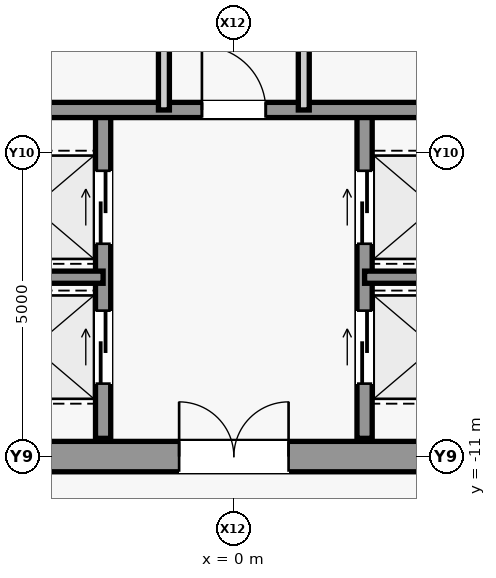
"""IFC4 building model, lengths in metres.
Left out: names, types, materials, properties, quantities, classifications, styles, units other than length and angle.
Written with IfcOpenShell. Run it as: python <this file> out.ifc"""

import sys

from ifc_helpers import new_model, si_unit, direction, frame, frame_2d, origin, place, context, subcontext, project, spatial, rectangle, extrude, source, transform, mapped, element, fill, save


model = new_model("IFC4")
c1 = context("Model", 3, precision=1e-05, world=origin(), true_north=direction((0.0, 1.0)))
c2 = subcontext(c1, "Body", "Model", "MODEL_VIEW")
j1 = project(units=[si_unit("LENGTHUNIT", "METRE"), si_unit("PLANEANGLEUNIT", "RADIAN")], contexts=[c1])
p1 = place(None, origin())
s1 = spatial("IfcSite", under=j1, at=p1, CompositionType="ELEMENT")
p2 = place(p1, origin())
s2 = spatial("IfcBuilding", under=s1, at=p2, CompositionType="ELEMENT")
p3 = place(p2, frame((0.0, 0.0, 32.6)))
s3 = spatial("IfcBuildingStorey", under=s2, at=p3, CompositionType="ELEMENT", Elevation=32.6)
m1 = source(origin(), c2, "Body", "SweptSolid", [
    extrude(rectangle(XDim=9.2, YDim=0.5, at=frame_2d((4.6, 0.0))), origin(), (0.0, 0.0, 1.0), 3.94),
])
p4 = place(p3, frame((-4.6, -11.0, 0.0), z_axis=(0.0, 0.0, 1.0), x_axis=(1.0, 0.0, 0.0)))
e1 = element("IfcWall", 1, at=p4, inside=s3, PredefinedType="SHEAR", context=c2, shape_type="MappedRepresentation", body=[
    mapped(m1, transform((0.0, 0.0, 0.0), scale=1.0)),
])
m2 = source(origin(), c2, "Body", "SweptSolid", [
    extrude(rectangle(XDim=1.8, YDim=2.25, at=frame_2d((0.9, 1.125))), frame((0.0, 0.26, 0.0), z_axis=(0.0, -1.0, 0.0), x_axis=(1.0, 0.0, 0.0)), (0.0, 0.0, 1.0), 0.52),
])
p5 = place(p4, frame((3.7, 0.0, 0.0)))
e2 = element("IfcOpeningElement", 2, at=p5, cuts=e1, PredefinedType="OPENING", context=c2, shape_type="MappedRepresentation", body=[
    mapped(m2, transform((0.0, 0.0, 0.0), scale=1.0)),
])
m3 = source(origin(), c2, "Body", "SweptSolid", [
    extrude(rectangle(XDim=5.4, YDim=0.25, at=frame_2d((2.7, 0.0))), origin(), (0.0, 0.0, 1.0), 3.94),
])
p6 = place(p3, frame((-2.15, -10.7, 0.0), z_axis=(0.0, 0.0, 1.0), x_axis=(0.0, 1.0, 0.0)))
e3 = element("IfcWall", 3, at=p6, inside=s3, PredefinedType="SHEAR", context=c2, shape_type="MappedRepresentation", body=[
    mapped(m3, transform((0.0, 0.0, 0.0), scale=1.0)),
])
m4 = source(origin(), c2, "Body", "SweptSolid", [
    extrude(rectangle(XDim=1.2, YDim=2.3, at=frame_2d((0.6, 1.15))), frame((0.0, 0.135, 0.0), z_axis=(0.0, -1.0, 0.0), x_axis=(1.0, 0.0, 0.0)), (0.0, 0.0, 1.0), 0.27),
])
p7 = place(p6, frame((0.9, 0.0, 0.0)))
e4 = element("IfcOpeningElement", 4, at=p7, cuts=e3, PredefinedType="OPENING", context=c2, shape_type="MappedRepresentation", body=[
    mapped(m4, transform((0.0, 0.0, 0.0), scale=1.0)),
])
p8 = place(p6, frame((3.2, 0.0, 0.0)))
e5 = element("IfcOpeningElement", 5, at=p8, cuts=e3, PredefinedType="OPENING", context=c2, shape_type="MappedRepresentation", body=[
    mapped(m4, transform((0.0, 0.0, 0.0), scale=1.0)),
])
p9 = place(p3, frame((2.15, -10.7, 0.0), z_axis=(0.0, 0.0, 1.0), x_axis=(0.0, 1.0, 0.0)))
e6 = element("IfcWall", 6, at=p9, inside=s3, PredefinedType="SHEAR", context=c2, shape_type="MappedRepresentation", body=[
    mapped(m3, transform((0.0, 0.0, 0.0), scale=1.0)),
])
p10 = place(p9, frame((0.9, 0.0, 0.0)))
e7 = element("IfcOpeningElement", 7, at=p10, cuts=e6, PredefinedType="OPENING", context=c2, shape_type="MappedRepresentation", body=[
    mapped(m4, transform((0.0, 0.0, 0.0), scale=1.0)),
])
p11 = place(p9, frame((3.2, 0.0, 0.0)))
e8 = element("IfcOpeningElement", 8, at=p11, cuts=e6, PredefinedType="OPENING", context=c2, shape_type="MappedRepresentation", body=[
    mapped(m4, transform((0.0, 0.0, 0.0), scale=1.0)),
])
m5 = source(origin(), c2, "Body", "SweptSolid", [
    extrude(rectangle(XDim=2.45, YDim=0.2, at=frame_2d((1.225, 0.0))), origin(), (0.0, 0.0, 1.0), 3.94),
])
for number, where, z_axis, x_axis in (
    (9, (-4.6, -8.05, 0.0), (0.0, 0.0, 1.0), (1.0, 0.0, 0.0)),
    (10, (2.15, -8.05, 0.0), (0.0, 0.0, 1.0), (1.0, 0.0, 0.0)),
):
    element("IfcWall", number, at=place(p3, frame(where, z_axis=z_axis, x_axis=x_axis)), inside=s3, PredefinedType="SHEAR", context=c2, shape_type="MappedRepresentation", body=[
        mapped(m5, transform((0.0, 0.0, 0.0), scale=1.0)),
    ])
m6 = source(origin(), c2, "Body", "SweptSolid", [
    extrude(rectangle(XDim=9.2, YDim=0.25, at=frame_2d((4.6, 0.0))), origin(), (0.0, 0.0, 1.0), 3.94),
])
p12 = place(p3, frame((-4.6, -5.3, 0.0), z_axis=(0.0, 0.0, 1.0), x_axis=(1.0, 0.0, 0.0)))
e11 = element("IfcWall", 11, at=p12, inside=s3, PredefinedType="SHEAR", context=c2, shape_type="MappedRepresentation", body=[
    mapped(m6, transform((0.0, 0.0, 0.0), scale=1.0)),
])
m7 = source(origin(), c2, "Body", "SweptSolid", [
    extrude(rectangle(XDim=1.05, YDim=2.2, at=frame_2d((0.525, 1.1))), frame((0.0, 0.135, 0.0), z_axis=(0.0, -1.0, 0.0), x_axis=(1.0, 0.0, 0.0)), (0.0, 0.0, 1.0), 0.27),
])
p13 = place(p12, frame((4.075, 0.0, 0.0)))
e12 = element("IfcOpeningElement", 12, at=p13, cuts=e11, PredefinedType="OPENING", context=c2, shape_type="MappedRepresentation", body=[
    mapped(m7, transform((0.0, 0.0, 0.0), scale=1.0)),
])
m8 = source(origin(), c2, "Body", "SweptSolid", [
    extrude(rectangle(XDim=10.6, YDim=0.18, at=frame_2d((5.3, 0.0))), origin(), (0.0, 0.0, 1.0), 3.94),
])
p14 = place(p3, frame((-1.15, -5.3, 0.0), z_axis=(0.0, 0.0, 1.0), x_axis=(0.0, 1.0, 0.0)))
e13 = element("IfcWall", 13, at=p14, inside=s3, PredefinedType="PARTITIONING", context=c2, shape_type="MappedRepresentation", body=[
    mapped(m8, transform((0.0, 0.0, 0.0), scale=1.0)),
])
m9 = source(origin(), c2, "Body", "SweptSolid", [
    extrude(rectangle(XDim=0.9, YDim=2.15, at=frame_2d((0.45, 1.075))), frame((0.0, 0.1, 0.0), z_axis=(0.0, -1.0, 0.0), x_axis=(1.0, 0.0, 0.0)), (0.0, 0.0, 1.0), 0.2),
])
p15 = place(p14, frame((1.3, 0.0, 0.0)))
e14 = element("IfcOpeningElement", 14, at=p15, cuts=e13, PredefinedType="OPENING", context=c2, shape_type="MappedRepresentation", body=[
    mapped(m9, transform((0.0, 0.0, 0.0), scale=1.0)),
])
p16 = place(p14, frame((4.9, 0.0, 0.0)))
e15 = element("IfcOpeningElement", 15, at=p16, cuts=e13, PredefinedType="OPENING", context=c2, shape_type="MappedRepresentation", body=[
    mapped(m9, transform((0.0, 0.0, 0.0), scale=1.0)),
])
p17 = place(p14, frame((7.8, 0.0, 0.0)))
e16 = element("IfcOpeningElement", 16, at=p17, cuts=e13, PredefinedType="OPENING", context=c2, shape_type="MappedRepresentation", body=[
    mapped(m9, transform((0.0, 0.0, 0.0), scale=1.0)),
])
p18 = place(p14, frame((9.475, 0.0, 0.0)))
e17 = element("IfcOpeningElement", 17, at=p18, cuts=e13, PredefinedType="OPENING", context=c2, shape_type="MappedRepresentation", body=[
    mapped(m9, transform((0.0, 0.0, 0.0), scale=1.0)),
])
p19 = place(p3, frame((1.15, -5.3, 0.0), z_axis=(0.0, 0.0, 1.0), x_axis=(0.0, 1.0, 0.0)))
e18 = element("IfcWall", 18, at=p19, inside=s3, PredefinedType="PARTITIONING", context=c2, shape_type="MappedRepresentation", body=[
    mapped(m8, transform((0.0, 0.0, 0.0), scale=1.0)),
])
p20 = place(p19, frame((4.2, 0.0, 0.0)))
e19 = element("IfcOpeningElement", 19, at=p20, cuts=e18, PredefinedType="OPENING", context=c2, shape_type="MappedRepresentation", body=[
    mapped(m9, transform((0.0, 0.0, 0.0), scale=1.0)),
])
p21 = place(p19, frame((9.475, 0.0, 0.0)))
e20 = element("IfcOpeningElement", 20, at=p21, cuts=e18, PredefinedType="OPENING", context=c2, shape_type="MappedRepresentation", body=[
    mapped(m9, transform((0.0, 0.0, 0.0), scale=1.0)),
])
m10 = source(origin(), c2, "Body", "SweptSolid", [
    extrude(rectangle(XDim=1.05, YDim=2.2, at=frame_2d((0.525, 1.1))), frame((0.0, 0.025, 0.0), z_axis=(0.0, -1.0, 0.0), x_axis=(1.0, 0.0, 0.0)), (0.0, 0.0, 1.0), 0.05),
])
p22 = place(p13, origin())
e21 = element("IfcDoor", 21, at=p22, inside=s3, OperationType="SINGLE_SWING_LEFT", PredefinedType="DOOR", context=c2, shape_type="MappedRepresentation", body=[
    mapped(m10, transform((0.0, 0.0, 0.0), scale=1.0)),
])
fill(e12, e21)
m11 = source(origin(), c2, "Body", "SweptSolid", [
    extrude(rectangle(XDim=1.8, YDim=2.25, at=frame_2d((0.9, 1.125))), frame((0.0, 0.025, 0.0), z_axis=(0.0, -1.0, 0.0), x_axis=(1.0, 0.0, 0.0)), (0.0, 0.0, 1.0), 0.05),
])
p23 = place(p5, origin())
e22 = element("IfcDoor", 22, at=p23, inside=s3, OperationType="SINGLE_SWING_LEFT", PredefinedType="DOOR", context=c2, shape_type="MappedRepresentation", body=[
    mapped(m11, transform((0.0, 0.0, 0.0), scale=1.0)),
])
fill(e2, e22)
m12 = source(origin(), c2, "Body", "SweptSolid", [
    extrude(rectangle(XDim=1.2, YDim=2.3, at=frame_2d((0.6, 1.15))), frame((0.0, 0.025, 0.0), z_axis=(0.0, -1.0, 0.0), x_axis=(1.0, 0.0, 0.0)), (0.0, 0.0, 1.0), 0.05),
])
p24 = place(p7, origin())
e23 = element("IfcDoor", 23, at=p24, inside=s3, OperationType="SLIDING_TO_LEFT", PredefinedType="DOOR", context=c2, shape_type="MappedRepresentation", body=[
    mapped(m12, transform((0.0, 0.0, 0.0), scale=1.0)),
])
fill(e4, e23)
p25 = place(p10, origin())
e24 = element("IfcDoor", 24, at=p25, inside=s3, OperationType="SLIDING_TO_LEFT", PredefinedType="DOOR", context=c2, shape_type="MappedRepresentation", body=[
    mapped(m12, transform((0.0, 0.0, 0.0), scale=1.0)),
])
fill(e7, e24)
p26 = place(p8, origin())
e25 = element("IfcDoor", 25, at=p26, inside=s3, OperationType="SLIDING_TO_LEFT", PredefinedType="DOOR", context=c2, shape_type="MappedRepresentation", body=[
    mapped(m12, transform((0.0, 0.0, 0.0), scale=1.0)),
])
fill(e5, e25)
p27 = place(p11, origin())
e26 = element("IfcDoor", 26, at=p27, inside=s3, OperationType="SLIDING_TO_LEFT", PredefinedType="DOOR", context=c2, shape_type="MappedRepresentation", body=[
    mapped(m12, transform((0.0, 0.0, 0.0), scale=1.0)),
])
fill(e8, e26)
save(model, sys.argv[1])
